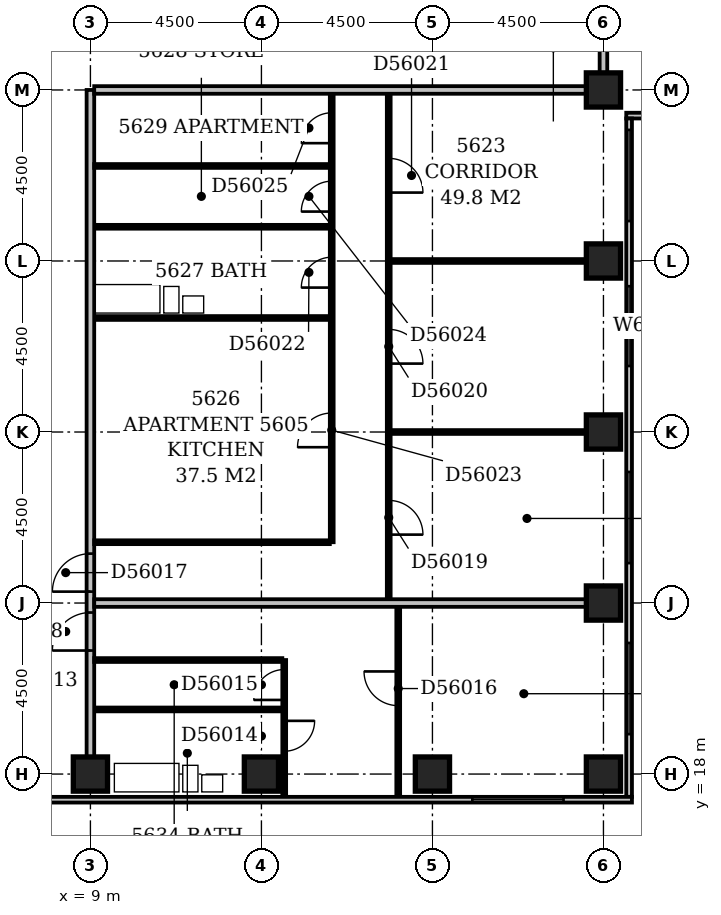
"""IFC4 building model, lengths in metres.
Left out: names, types, materials, properties, quantities, classifications, styles, units other than length and angle.
Written with IfcOpenShell. Run it as: python <this file> out.ifc"""

import sys

from ifc_helpers import new_model, si_unit, direction, frame, frame_2d, origin, origin_2d, place, context, subcontext, project, spatial, rectangle, extrude, element, fill, save


model = new_model("IFC4")
c1 = context("Model", 3, precision=1e-05, world=origin(), true_north=direction((0.0, 1.0)))
c2 = subcontext(c1, "Body", "Model", "MODEL_VIEW")
j1 = project(units=[si_unit("LENGTHUNIT", "METRE"), si_unit("PLANEANGLEUNIT", "RADIAN")], contexts=[c1])
p1 = place(None, origin())
s1 = spatial("IfcSite", under=j1, at=p1, CompositionType="ELEMENT")
p2 = place(p1, origin())
s2 = spatial("IfcBuilding", under=s1, at=p2, CompositionType="ELEMENT")
p3 = place(p2, frame((0.0, 0.0, 218.6)))
s3 = spatial("IfcBuildingStorey", under=s2, at=p3, CompositionType="ELEMENT", Elevation=218.6)
for number, where, z_axis, x_axis in (
    (1, (9.0, 18.0, -0.3), (0.0, 0.0, 1.0), (1.0, 0.0, 0.0)),
    (2, (13.5, 18.0, -0.3), (0.0, 0.0, 1.0), (1.0, 0.0, 0.0)),
    (3, (18.0, 18.0, -0.3), (0.0, 0.0, 1.0), (1.0, 0.0, 0.0)),
    (4, (22.5, 18.0, -0.3), (0.0, 0.0, 1.0), (1.0, 0.0, 0.0)),
    (5, (22.5, 22.5, -0.3), (0.0, 0.0, 1.0), (1.0, 0.0, 0.0)),
    (6, (22.5, 27.0, -0.3), (0.0, 0.0, 1.0), (1.0, 0.0, 0.0)),
    (7, (22.5, 31.5, -0.3), (0.0, 0.0, 1.0), (1.0, 0.0, 0.0)),
    (8, (22.5, 36.0, -0.3), (0.0, 0.0, 1.0), (1.0, 0.0, 0.0)),
):
    element("IfcColumn", number, at=place(p3, frame(where, z_axis=z_axis, x_axis=x_axis)), inside=s3, PredefinedType="COLUMN", context=c2, shape_type="SweptSolid", body=[
        extrude(rectangle(XDim=0.9, YDim=0.9, at=origin_2d()), origin(), (0.0, 0.0, 1.0), 3.6),
    ])
p4 = place(p3, frame((3.9, 17.325, 0.0), z_axis=(0.0, 0.0, 1.0), x_axis=(1.0, 0.0, 0.0)))
e9 = element("IfcWall", 9, at=p4, inside=s3, PredefinedType="STANDARD", context=c2, shape_type="SweptSolid", body=[
    extrude(rectangle(XDim=19.35, YDim=0.15, at=frame_2d((9.675, 0.0))), origin(), (0.0, 0.0, 1.0), 2.7),
])
p5 = place(p4, frame((15.15, 0.0, 0.6)))
e10 = element("IfcOpeningElement", 10, at=p5, cuts=e9, PredefinedType="OPENING", context=c2, shape_type="SweptSolid", body=[
    extrude(rectangle(XDim=2.4, YDim=1.8, at=frame_2d((1.2, 0.9))), frame((0.0, 0.087, 0.0), z_axis=(0.0, -1.0, 0.0), x_axis=(1.0, 0.0, 0.0)), (0.0, 0.0, 1.0), 0.174),
])
p6 = place(p3, frame((23.175, 17.4, 0.0), z_axis=(0.0, 0.0, 1.0), x_axis=(0.0, 1.0, 0.0)))
e11 = element("IfcWall", 11, at=p6, inside=s3, PredefinedType="STANDARD", context=c2, shape_type="SweptSolid", body=[
    extrude(rectangle(XDim=17.85, YDim=0.15, at=frame_2d((8.925, 0.0))), origin(), (0.0, 0.0, 1.0), 2.7),
])
p7 = place(p6, frame((1.65, 0.0, 0.6)))
e12 = element("IfcOpeningElement", 12, at=p7, cuts=e11, PredefinedType="OPENING", context=c2, shape_type="SweptSolid", body=[
    extrude(rectangle(XDim=2.4, YDim=1.8, at=frame_2d((1.2, 0.9))), frame((0.0, 0.087, 0.0), z_axis=(0.0, -1.0, 0.0), x_axis=(1.0, 0.0, 0.0)), (0.0, 0.0, 1.0), 0.174),
])
p8 = place(p6, frame((6.15, 0.0, 0.6)))
e13 = element("IfcOpeningElement", 13, at=p8, cuts=e11, PredefinedType="OPENING", context=c2, shape_type="SweptSolid", body=[
    extrude(rectangle(XDim=2.4, YDim=1.8, at=frame_2d((1.2, 0.9))), frame((0.0, 0.087, 0.0), z_axis=(0.0, -1.0, 0.0), x_axis=(1.0, 0.0, 0.0)), (0.0, 0.0, 1.0), 0.174),
])
p9 = place(p6, frame((11.337, 0.0, 0.6)))
e14 = element("IfcOpeningElement", 14, at=p9, cuts=e11, PredefinedType="OPENING", context=c2, shape_type="SweptSolid", body=[
    extrude(rectangle(XDim=2.1, YDim=1.8, at=frame_2d((1.05, 0.9))), frame((0.0, 0.087, 0.0), z_axis=(0.0, -1.0, 0.0), x_axis=(1.0, 0.0, 0.0)), (0.0, 0.0, 1.0), 0.174),
])
p10 = place(p6, frame((15.15, 0.0, 0.6)))
e15 = element("IfcOpeningElement", 15, at=p10, cuts=e11, PredefinedType="OPENING", context=c2, shape_type="SweptSolid", body=[
    extrude(rectangle(XDim=2.4, YDim=1.8, at=frame_2d((1.2, 0.9))), frame((0.0, 0.087, 0.0), z_axis=(0.0, -1.0, 0.0), x_axis=(1.0, 0.0, 0.0)), (0.0, 0.0, 1.0), 0.174),
])
p11 = place(p3, frame((23.1, 35.325, 0.0), z_axis=(0.0, 0.0, 1.0), x_axis=(1.0, 0.0, 0.0)))
e16 = element("IfcWall", 16, at=p11, inside=s3, PredefinedType="STANDARD", context=c2, shape_type="SweptSolid", body=[
    extrude(rectangle(XDim=27.15, YDim=0.15, at=frame_2d((13.575, 0.0))), origin(), (0.0, 0.0, 1.0), 2.7),
])
p12 = place(p11, frame((0.45, 0.0, 0.6)))
e17 = element("IfcOpeningElement", 17, at=p12, cuts=e16, PredefinedType="OPENING", context=c2, shape_type="SweptSolid", body=[
    extrude(rectangle(XDim=2.4, YDim=1.8, at=frame_2d((1.2, 0.9))), frame((0.0, 0.087, 0.0), z_axis=(0.0, -1.0, 0.0), x_axis=(1.0, 0.0, 0.0)), (0.0, 0.0, 1.0), 0.174),
])
p13 = place(p11, frame((4.571, 0.0, 0.6)))
e18 = element("IfcOpeningElement", 18, at=p13, cuts=e16, PredefinedType="OPENING", context=c2, shape_type="SweptSolid", body=[
    extrude(rectangle(XDim=2.1, YDim=1.8, at=frame_2d((1.05, 0.9))), frame((0.0, 0.087, 0.0), z_axis=(0.0, -1.0, 0.0), x_axis=(1.0, 0.0, 0.0)), (0.0, 0.0, 1.0), 0.174),
])
p14 = place(p11, frame((9.45, 0.0, 0.6)))
e19 = element("IfcOpeningElement", 19, at=p14, cuts=e16, PredefinedType="OPENING", context=c2, shape_type="SweptSolid", body=[
    extrude(rectangle(XDim=2.4, YDim=1.8, at=frame_2d((1.2, 0.9))), frame((0.0, 0.087, 0.0), z_axis=(0.0, -1.0, 0.0), x_axis=(1.0, 0.0, 0.0)), (0.0, 0.0, 1.0), 0.174),
])
p15 = place(p11, frame((13.95, 0.0, 0.6)))
e20 = element("IfcOpeningElement", 20, at=p15, cuts=e16, PredefinedType="OPENING", context=c2, shape_type="SweptSolid", body=[
    extrude(rectangle(XDim=2.4, YDim=1.8, at=frame_2d((1.2, 0.9))), frame((0.0, 0.087, 0.0), z_axis=(0.0, -1.0, 0.0), x_axis=(1.0, 0.0, 0.0)), (0.0, 0.0, 1.0), 0.174),
])
p16 = place(p11, frame((19.657, 0.0, 0.6)))
e21 = element("IfcOpeningElement", 21, at=p16, cuts=e16, PredefinedType="OPENING", context=c2, shape_type="SweptSolid", body=[
    extrude(rectangle(XDim=1.5, YDim=1.8, at=frame_2d((0.75, 0.9))), frame((0.0, 0.087, 0.0), z_axis=(0.0, -1.0, 0.0), x_axis=(1.0, 0.0, 0.0)), (0.0, 0.0, 1.0), 0.174),
])
p17 = place(p11, frame((22.95, 0.0, 0.6)))
e22 = element("IfcOpeningElement", 22, at=p17, cuts=e16, PredefinedType="OPENING", context=c2, shape_type="SweptSolid", body=[
    extrude(rectangle(XDim=2.4, YDim=1.8, at=frame_2d((1.2, 0.9))), frame((0.0, 0.087, 0.0), z_axis=(0.0, -1.0, 0.0), x_axis=(1.0, 0.0, 0.0)), (0.0, 0.0, 1.0), 0.174),
])
p18 = place(p3, frame((14.1, 17.4, 0.0), z_axis=(0.0, 0.0, 1.0), x_axis=(0.0, 1.0, 0.0)))
e23 = element("IfcWall", 23, at=p18, inside=s3, PredefinedType="PARTITIONING", context=c2, shape_type="SweptSolid", body=[
    extrude(rectangle(XDim=3.6, YDim=0.1, at=frame_2d((1.8, 0.0))), origin(), (0.0, 0.0, 1.0), 3.3),
])
p19 = place(p18, frame((1.2, 0.0, 0.0)))
e24 = element("IfcOpeningElement", 24, at=p19, cuts=e23, PredefinedType="OPENING", context=c2, shape_type="SweptSolid", body=[
    extrude(rectangle(XDim=0.8, YDim=2.1, at=frame_2d((0.4, 1.05))), frame((0.0, 0.062, 0.0), z_axis=(0.0, -1.0, 0.0), x_axis=(1.0, 0.0, 0.0)), (0.0, 0.0, 1.0), 0.124),
])
p20 = place(p18, frame((2.55, 0.0, 0.0)))
e25 = element("IfcOpeningElement", 25, at=p20, cuts=e23, PredefinedType="OPENING", context=c2, shape_type="SweptSolid", body=[
    extrude(rectangle(XDim=0.8, YDim=2.1, at=frame_2d((0.4, 1.05))), frame((0.0, 0.062, 0.0), z_axis=(0.0, -1.0, 0.0), x_axis=(1.0, 0.0, 0.0)), (0.0, 0.0, 1.0), 0.124),
])
p21 = place(p3, frame((17.1, 17.4, 0.0), z_axis=(0.0, 0.0, 1.0), x_axis=(0.0, 1.0, 0.0)))
e26 = element("IfcWall", 26, at=p21, inside=s3, PredefinedType="PARTITIONING", context=c2, shape_type="SweptSolid", body=[
    extrude(rectangle(XDim=5.0, YDim=0.1, at=frame_2d((2.5, 0.0))), origin(), (0.0, 0.0, 1.0), 3.3),
])
p22 = place(p21, frame((2.4, 0.0, 0.0)))
e27 = element("IfcOpeningElement", 27, at=p22, cuts=e26, PredefinedType="OPENING", context=c2, shape_type="SweptSolid", body=[
    extrude(rectangle(XDim=0.9, YDim=2.1, at=frame_2d((0.45, 1.05))), frame((0.0, 0.062, 0.0), z_axis=(0.0, -1.0, 0.0), x_axis=(1.0, 0.0, 0.0)), (0.0, 0.0, 1.0), 0.124),
])
p23 = place(p3, frame((9.0, 18.45, 0.0), z_axis=(0.0, 0.0, 1.0), x_axis=(0.0, 1.0, 0.0)))
e28 = element("IfcWall", 28, at=p23, inside=s3, PredefinedType="PARTITIONING", context=c2, shape_type="SweptSolid", body=[
    extrude(rectangle(XDim=17.55, YDim=0.2, at=frame_2d((8.775, 0.0))), origin(), (0.0, 0.0, 1.0), 3.3),
])
p24 = place(p23, frame((4.35, 0.0, 0.0)))
e29 = element("IfcOpeningElement", 29, at=p24, cuts=e28, PredefinedType="OPENING", context=c2, shape_type="SweptSolid", body=[
    extrude(rectangle(XDim=1.0, YDim=2.1, at=frame_2d((0.5, 1.05))), frame((0.0, 0.112, 0.0), z_axis=(0.0, -1.0, 0.0), x_axis=(1.0, 0.0, 0.0)), (0.0, 0.0, 1.0), 0.224),
])
p25 = place(p23, frame((2.8, 0.0, 0.0)))
e30 = element("IfcOpeningElement", 30, at=p25, cuts=e28, PredefinedType="OPENING", context=c2, shape_type="SweptSolid", body=[
    extrude(rectangle(XDim=1.0, YDim=2.1, at=frame_2d((0.5, 1.05))), frame((0.0, 0.112, 0.0), z_axis=(0.0, -1.0, 0.0), x_axis=(1.0, 0.0, 0.0)), (0.0, 0.0, 1.0), 0.224),
])
p26 = place(p3, frame((9.1, 19.7, 0.0), z_axis=(0.0, 0.0, 1.0), x_axis=(1.0, 0.0, 0.0)))
e31 = element("IfcWall", 31, at=p26, inside=s3, PredefinedType="PLUMBINGWALL", context=c2, shape_type="SweptSolid", body=[
    extrude(rectangle(XDim=4.95, YDim=0.1, at=frame_2d((2.475, 0.0))), origin(), (0.0, 0.0, 1.0), 3.3),
])
p27 = place(p3, frame((9.1, 21.0, 0.0), z_axis=(0.0, 0.0, 1.0), x_axis=(1.0, 0.0, 0.0)))
e32 = element("IfcWall", 32, at=p27, inside=s3, PredefinedType="PARTITIONING", context=c2, shape_type="SweptSolid", body=[
    extrude(rectangle(XDim=4.95, YDim=0.1, at=frame_2d((2.475, 0.0))), origin(), (0.0, 0.0, 1.0), 3.3),
])
p28 = place(p3, frame((9.1, 22.5, 0.0), z_axis=(0.0, 0.0, 1.0), x_axis=(1.0, 0.0, 0.0)))
e33 = element("IfcWall", 33, at=p28, inside=s3, PredefinedType="PARTITIONING", context=c2, shape_type="SweptSolid", body=[
    extrude(rectangle(XDim=12.95, YDim=0.2, at=frame_2d((6.475, 0.0))), origin(), (0.0, 0.0, 1.0), 3.3),
])
p29 = place(p3, frame((16.85, 22.6, 0.0), z_axis=(0.0, 0.0, 1.0), x_axis=(0.0, 1.0, 0.0)))
e34 = element("IfcWall", 34, at=p29, inside=s3, PredefinedType="PARTITIONING", context=c2, shape_type="SweptSolid", body=[
    extrude(rectangle(XDim=13.3, YDim=0.1, at=frame_2d((6.65, 0.0))), origin(), (0.0, 0.0, 1.0), 3.3),
])
p30 = place(p29, frame((1.7, 0.0, 0.0)))
e35 = element("IfcOpeningElement", 35, at=p30, cuts=e34, PredefinedType="OPENING", context=c2, shape_type="SweptSolid", body=[
    extrude(rectangle(XDim=0.9, YDim=2.1, at=frame_2d((0.45, 1.05))), frame((0.0, 0.062, 0.0), z_axis=(0.0, -1.0, 0.0), x_axis=(1.0, 0.0, 0.0)), (0.0, 0.0, 1.0), 0.124),
])
p31 = place(p29, frame((6.2, 0.0, 0.0)))
e36 = element("IfcOpeningElement", 36, at=p31, cuts=e34, PredefinedType="OPENING", context=c2, shape_type="SweptSolid", body=[
    extrude(rectangle(XDim=0.9, YDim=2.1, at=frame_2d((0.45, 1.05))), frame((0.0, 0.062, 0.0), z_axis=(0.0, -1.0, 0.0), x_axis=(1.0, 0.0, 0.0)), (0.0, 0.0, 1.0), 0.124),
])
p32 = place(p29, frame((10.7, 0.0, 0.0)))
e37 = element("IfcOpeningElement", 37, at=p32, cuts=e34, PredefinedType="OPENING", context=c2, shape_type="SweptSolid", body=[
    extrude(rectangle(XDim=0.9, YDim=2.1, at=frame_2d((0.45, 1.05))), frame((0.0, 0.062, 0.0), z_axis=(0.0, -1.0, 0.0), x_axis=(1.0, 0.0, 0.0)), (0.0, 0.0, 1.0), 0.124),
])
p33 = place(p3, frame((9.1, 24.1, 0.0), z_axis=(0.0, 0.0, 1.0), x_axis=(1.0, 0.0, 0.0)))
e38 = element("IfcWall", 38, at=p33, inside=s3, PredefinedType="PARTITIONING", context=c2, shape_type="SweptSolid", body=[
    extrude(rectangle(XDim=6.2, YDim=0.1, at=frame_2d((3.1, 0.0))), origin(), (0.0, 0.0, 1.0), 3.3),
])
p34 = place(p3, frame((15.35, 24.1, 0.0), z_axis=(0.0, 0.0, 1.0), x_axis=(0.0, 1.0, 0.0)))
e39 = element("IfcWall", 39, at=p34, inside=s3, PredefinedType="PARTITIONING", context=c2, shape_type="SweptSolid", body=[
    extrude(rectangle(XDim=11.8, YDim=0.1, at=frame_2d((5.9, 0.0))), origin(), (0.0, 0.0, 1.0), 3.3),
])
p35 = place(p34, frame((6.7, 0.0, 0.0)))
e40 = element("IfcOpeningElement", 40, at=p35, cuts=e39, PredefinedType="OPENING", context=c2, shape_type="SweptSolid", body=[
    extrude(rectangle(XDim=0.8, YDim=2.1, at=frame_2d((0.4, 1.05))), frame((0.0, 0.062, 0.0), z_axis=(0.0, -1.0, 0.0), x_axis=(1.0, 0.0, 0.0)), (0.0, 0.0, 1.0), 0.124),
])
p36 = place(p34, frame((2.5, 0.0, 0.0)))
e41 = element("IfcOpeningElement", 41, at=p36, cuts=e39, PredefinedType="OPENING", context=c2, shape_type="SweptSolid", body=[
    extrude(rectangle(XDim=0.9, YDim=2.1, at=frame_2d((0.45, 1.05))), frame((0.0, 0.062, 0.0), z_axis=(0.0, -1.0, 0.0), x_axis=(1.0, 0.0, 0.0)), (0.0, 0.0, 1.0), 0.124),
])
p37 = place(p34, frame((8.7, 0.0, 0.0)))
e42 = element("IfcOpeningElement", 42, at=p37, cuts=e39, PredefinedType="OPENING", context=c2, shape_type="SweptSolid", body=[
    extrude(rectangle(XDim=0.8, YDim=2.1, at=frame_2d((0.4, 1.05))), frame((0.0, 0.062, 0.0), z_axis=(0.0, -1.0, 0.0), x_axis=(1.0, 0.0, 0.0)), (0.0, 0.0, 1.0), 0.124),
])
p38 = place(p34, frame((10.5, 0.0, 0.0)))
e43 = element("IfcOpeningElement", 43, at=p38, cuts=e39, PredefinedType="OPENING", context=c2, shape_type="SweptSolid", body=[
    extrude(rectangle(XDim=0.8, YDim=2.1, at=frame_2d((0.4, 1.05))), frame((0.0, 0.062, 0.0), z_axis=(0.0, -1.0, 0.0), x_axis=(1.0, 0.0, 0.0)), (0.0, 0.0, 1.0), 0.124),
])
p39 = place(p3, frame((16.9, 27.0, 0.0), z_axis=(0.0, 0.0, 1.0), x_axis=(1.0, 0.0, 0.0)))
e44 = element("IfcWall", 44, at=p39, inside=s3, PredefinedType="PARTITIONING", context=c2, shape_type="SweptSolid", body=[
    extrude(rectangle(XDim=5.15, YDim=0.1, at=frame_2d((2.575, 0.0))), origin(), (0.0, 0.0, 1.0), 2.7),
])
p40 = place(p3, frame((9.1, 30.0, 0.0), z_axis=(0.0, 0.0, 1.0), x_axis=(1.0, 0.0, 0.0)))
e45 = element("IfcWall", 45, at=p40, inside=s3, PredefinedType="PLUMBINGWALL", context=c2, shape_type="SweptSolid", body=[
    extrude(rectangle(XDim=6.2, YDim=0.1, at=frame_2d((3.1, 0.0))), origin(), (0.0, 0.0, 1.0), 3.3),
])
p41 = place(p3, frame((16.9, 31.5, 0.0), z_axis=(0.0, 0.0, 1.0), x_axis=(1.0, 0.0, 0.0)))
e46 = element("IfcWall", 46, at=p41, inside=s3, PredefinedType="PARTITIONING", context=c2, shape_type="SweptSolid", body=[
    extrude(rectangle(XDim=5.15, YDim=0.1, at=frame_2d((2.575, 0.0))), origin(), (0.0, 0.0, 1.0), 3.3),
])
p42 = place(p3, frame((9.1, 32.4, 0.0), z_axis=(0.0, 0.0, 1.0), x_axis=(1.0, 0.0, 0.0)))
e47 = element("IfcWall", 47, at=p42, inside=s3, PredefinedType="PLUMBINGWALL", context=c2, shape_type="SweptSolid", body=[
    extrude(rectangle(XDim=6.2, YDim=0.1, at=frame_2d((3.1, 0.0))), origin(), (0.0, 0.0, 1.0), 3.3),
])
p43 = place(p3, frame((9.1, 34.0, 0.0), z_axis=(0.0, 0.0, 1.0), x_axis=(1.0, 0.0, 0.0)))
e48 = element("IfcWall", 48, at=p43, inside=s3, PredefinedType="PARTITIONING", context=c2, shape_type="SweptSolid", body=[
    extrude(rectangle(XDim=6.2, YDim=0.1, at=frame_2d((3.1, 0.0))), origin(), (0.0, 0.0, 1.0), 3.3),
])
p44 = place(p3, frame((9.1, 36.0, 0.0), z_axis=(0.0, 0.0, 1.0), x_axis=(1.0, 0.0, 0.0)))
e49 = element("IfcWall", 49, at=p44, inside=s3, PredefinedType="PARTITIONING", context=c2, shape_type="SweptSolid", body=[
    extrude(rectangle(XDim=12.95, YDim=0.2, at=frame_2d((6.475, 0.0))), origin(), (0.0, 0.0, 1.0), 3.3),
])
p45 = place(p3, frame((22.5, 36.45, 0.0), z_axis=(0.0, 0.0, 1.0), x_axis=(0.0, 1.0, 0.0)))
e50 = element("IfcWall", 50, at=p45, inside=s3, PredefinedType="PARTITIONING", context=c2, shape_type="SweptSolid", body=[
    extrude(rectangle(XDim=13.05, YDim=0.2, at=frame_2d((6.525, 0.0))), origin(), (0.0, 0.0, 1.0), 3.3),
])
p46 = place(p5, origin())
e51 = element("IfcWindow", 51, at=p46, inside=s3, PartitioningType="SINGLE_PANEL", PredefinedType="WINDOW", context=c2, shape_type="SweptSolid", body=[
    extrude(rectangle(XDim=2.4, YDim=1.8, at=frame_2d((1.2, 0.9))), frame((0.0, 0.03, 0.0), z_axis=(0.0, -1.0, 0.0), x_axis=(1.0, 0.0, 0.0)), (0.0, 0.0, 1.0), 0.06),
])
fill(e10, e51)
p47 = place(p7, origin())
e52 = element("IfcWindow", 52, at=p47, inside=s3, PartitioningType="SINGLE_PANEL", PredefinedType="WINDOW", context=c2, shape_type="SweptSolid", body=[
    extrude(rectangle(XDim=2.4, YDim=1.8, at=frame_2d((1.2, 0.9))), frame((0.0, 0.03, 0.0), z_axis=(0.0, -1.0, 0.0), x_axis=(1.0, 0.0, 0.0)), (0.0, 0.0, 1.0), 0.06),
])
fill(e12, e52)
p48 = place(p8, origin())
e53 = element("IfcWindow", 53, at=p48, inside=s3, PartitioningType="SINGLE_PANEL", PredefinedType="WINDOW", context=c2, shape_type="SweptSolid", body=[
    extrude(rectangle(XDim=2.4, YDim=1.8, at=frame_2d((1.2, 0.9))), frame((0.0, 0.03, 0.0), z_axis=(0.0, -1.0, 0.0), x_axis=(1.0, 0.0, 0.0)), (0.0, 0.0, 1.0), 0.06),
])
fill(e13, e53)
p49 = place(p9, origin())
e54 = element("IfcWindow", 54, at=p49, inside=s3, PartitioningType="SINGLE_PANEL", PredefinedType="WINDOW", context=c2, shape_type="SweptSolid", body=[
    extrude(rectangle(XDim=2.1, YDim=1.8, at=frame_2d((1.05, 0.9))), frame((0.0, 0.03, 0.0), z_axis=(0.0, -1.0, 0.0), x_axis=(1.0, 0.0, 0.0)), (0.0, 0.0, 1.0), 0.06),
])
fill(e14, e54)
p50 = place(p10, origin())
e55 = element("IfcWindow", 55, at=p50, inside=s3, PartitioningType="SINGLE_PANEL", PredefinedType="WINDOW", context=c2, shape_type="SweptSolid", body=[
    extrude(rectangle(XDim=2.4, YDim=1.8, at=frame_2d((1.2, 0.9))), frame((0.0, 0.03, 0.0), z_axis=(0.0, -1.0, 0.0), x_axis=(1.0, 0.0, 0.0)), (0.0, 0.0, 1.0), 0.06),
])
fill(e15, e55)
p51 = place(p19, origin())
e56 = element("IfcDoor", 56, at=p51, inside=s3, OperationType="SINGLE_SWING_RIGHT", PredefinedType="DOOR", context=c2, shape_type="SweptSolid", body=[
    extrude(rectangle(XDim=0.8, YDim=2.1, at=frame_2d((0.4, 1.05))), frame((0.0, 0.025, 0.0), z_axis=(0.0, -1.0, 0.0), x_axis=(1.0, 0.0, 0.0)), (0.0, 0.0, 1.0), 0.05),
])
fill(e24, e56)
p52 = place(p20, origin())
e57 = element("IfcDoor", 57, at=p52, inside=s3, OperationType="SINGLE_SWING_LEFT", PredefinedType="DOOR", context=c2, shape_type="SweptSolid", body=[
    extrude(rectangle(XDim=0.8, YDim=2.1, at=frame_2d((0.4, 1.05))), frame((0.0, 0.025, 0.0), z_axis=(0.0, -1.0, 0.0), x_axis=(1.0, 0.0, 0.0)), (0.0, 0.0, 1.0), 0.05),
])
fill(e25, e57)
p53 = place(p22, frame((0.9, 0.0, 0.0), z_axis=(0.0, 0.0, 1.0), x_axis=(-1.0, 0.0, 0.0)))
e58 = element("IfcDoor", 58, at=p53, inside=s3, OperationType="SINGLE_SWING_LEFT", PredefinedType="DOOR", context=c2, shape_type="SweptSolid", body=[
    extrude(rectangle(XDim=0.9, YDim=2.1, at=frame_2d((0.45, 1.05))), frame((0.0, 0.025, 0.0), z_axis=(0.0, -1.0, 0.0), x_axis=(1.0, 0.0, 0.0)), (0.0, 0.0, 1.0), 0.05),
])
fill(e27, e58)
p54 = place(p24, origin())
e59 = element("IfcDoor", 59, at=p54, inside=s3, OperationType="SINGLE_SWING_LEFT", PredefinedType="DOOR", context=c2, shape_type="SweptSolid", body=[
    extrude(rectangle(XDim=1.0, YDim=2.1, at=frame_2d((0.5, 1.05))), frame((0.0, 0.025, 0.0), z_axis=(0.0, -1.0, 0.0), x_axis=(1.0, 0.0, 0.0)), (0.0, 0.0, 1.0), 0.05),
])
fill(e29, e59)
p55 = place(p25, origin())
e60 = element("IfcDoor", 60, at=p55, inside=s3, OperationType="SINGLE_SWING_LEFT", PredefinedType="DOOR", context=c2, shape_type="SweptSolid", body=[
    extrude(rectangle(XDim=1.0, YDim=2.1, at=frame_2d((0.5, 1.05))), frame((0.0, 0.025, 0.0), z_axis=(0.0, -1.0, 0.0), x_axis=(1.0, 0.0, 0.0)), (0.0, 0.0, 1.0), 0.05),
])
fill(e30, e60)
p56 = place(p30, frame((0.9, 0.0, 0.0), z_axis=(0.0, 0.0, 1.0), x_axis=(-1.0, 0.0, 0.0)))
e61 = element("IfcDoor", 61, at=p56, inside=s3, OperationType="SINGLE_SWING_RIGHT", PredefinedType="DOOR", context=c2, shape_type="SweptSolid", body=[
    extrude(rectangle(XDim=0.9, YDim=2.1, at=frame_2d((0.45, 1.05))), frame((0.0, 0.025, 0.0), z_axis=(0.0, -1.0, 0.0), x_axis=(1.0, 0.0, 0.0)), (0.0, 0.0, 1.0), 0.05),
])
fill(e35, e61)
p57 = place(p31, frame((0.9, 0.0, 0.0), z_axis=(0.0, 0.0, 1.0), x_axis=(-1.0, 0.0, 0.0)))
e62 = element("IfcDoor", 62, at=p57, inside=s3, OperationType="SINGLE_SWING_RIGHT", PredefinedType="DOOR", context=c2, shape_type="SweptSolid", body=[
    extrude(rectangle(XDim=0.9, YDim=2.1, at=frame_2d((0.45, 1.05))), frame((0.0, 0.025, 0.0), z_axis=(0.0, -1.0, 0.0), x_axis=(1.0, 0.0, 0.0)), (0.0, 0.0, 1.0), 0.05),
])
fill(e36, e62)
p58 = place(p32, frame((0.9, 0.0, 0.0), z_axis=(0.0, 0.0, 1.0), x_axis=(-1.0, 0.0, 0.0)))
e63 = element("IfcDoor", 63, at=p58, inside=s3, OperationType="SINGLE_SWING_RIGHT", PredefinedType="DOOR", context=c2, shape_type="SweptSolid", body=[
    extrude(rectangle(XDim=0.9, YDim=2.1, at=frame_2d((0.45, 1.05))), frame((0.0, 0.025, 0.0), z_axis=(0.0, -1.0, 0.0), x_axis=(1.0, 0.0, 0.0)), (0.0, 0.0, 1.0), 0.05),
])
fill(e37, e63)
p59 = place(p35, origin())
e64 = element("IfcDoor", 64, at=p59, inside=s3, OperationType="SINGLE_SWING_LEFT", PredefinedType="DOOR", context=c2, shape_type="SweptSolid", body=[
    extrude(rectangle(XDim=0.8, YDim=2.1, at=frame_2d((0.4, 1.05))), frame((0.0, 0.025, 0.0), z_axis=(0.0, -1.0, 0.0), x_axis=(1.0, 0.0, 0.0)), (0.0, 0.0, 1.0), 0.05),
])
fill(e40, e64)
p60 = place(p36, origin())
e65 = element("IfcDoor", 65, at=p60, inside=s3, OperationType="SINGLE_SWING_LEFT", PredefinedType="DOOR", context=c2, shape_type="SweptSolid", body=[
    extrude(rectangle(XDim=0.9, YDim=2.1, at=frame_2d((0.45, 1.05))), frame((0.0, 0.025, 0.0), z_axis=(0.0, -1.0, 0.0), x_axis=(1.0, 0.0, 0.0)), (0.0, 0.0, 1.0), 0.05),
])
fill(e41, e65)
p61 = place(p37, origin())
e66 = element("IfcDoor", 66, at=p61, inside=s3, OperationType="SINGLE_SWING_LEFT", PredefinedType="DOOR", context=c2, shape_type="SweptSolid", body=[
    extrude(rectangle(XDim=0.8, YDim=2.1, at=frame_2d((0.4, 1.05))), frame((0.0, 0.025, 0.0), z_axis=(0.0, -1.0, 0.0), x_axis=(1.0, 0.0, 0.0)), (0.0, 0.0, 1.0), 0.05),
])
fill(e42, e66)
p62 = place(p38, origin())
e67 = element("IfcDoor", 67, at=p62, inside=s3, OperationType="SINGLE_SWING_LEFT", PredefinedType="DOOR", context=c2, shape_type="SweptSolid", body=[
    extrude(rectangle(XDim=0.8, YDim=2.1, at=frame_2d((0.4, 1.05))), frame((0.0, 0.025, 0.0), z_axis=(0.0, -1.0, 0.0), x_axis=(1.0, 0.0, 0.0)), (0.0, 0.0, 1.0), 0.05),
])
fill(e43, e67)
save(model, sys.argv[1])
